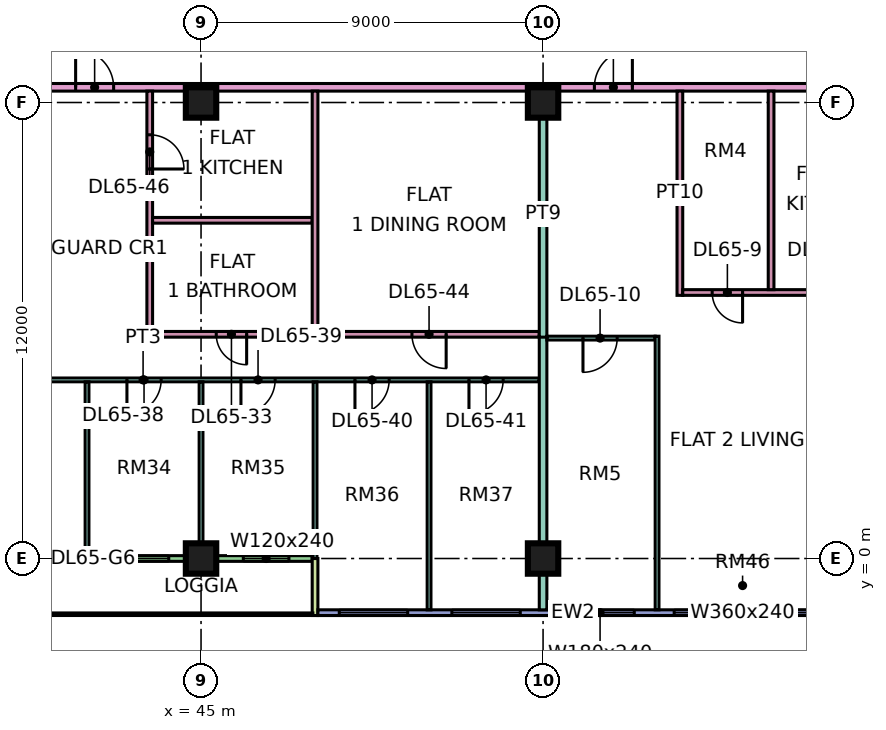
"""IFC4 building model, lengths in metres.
Left out: names, types, materials, properties, quantities, classifications, styles, units other than length and angle.
Written with IfcOpenShell. Run it as: python <this file> out.ifc"""

import sys

from ifc_helpers import new_model, si_unit, direction, frame, frame_2d, origin, origin_2d, place, context, subcontext, project, spatial, rectangle, extrude, element, fill, save


model = new_model("IFC4")
c1 = context("Model", 3, precision=1e-05, world=origin(), true_north=direction((0.0, 1.0)))
c2 = subcontext(c1, "Body", "Model", "MODEL_VIEW")
j1 = project(units=[si_unit("LENGTHUNIT", "METRE"), si_unit("PLANEANGLEUNIT", "RADIAN")], contexts=[c1])
p1 = place(None, origin())
s1 = spatial("IfcSite", under=j1, at=p1, CompositionType="ELEMENT")
p2 = place(p1, origin())
s2 = spatial("IfcBuilding", under=s1, at=p2, CompositionType="ELEMENT")
p3 = place(p2, frame((0.0, 0.0, 280.9)))
s3 = spatial("IfcBuildingStorey", under=s2, at=p3, CompositionType="ELEMENT", Elevation=280.9)
for number, where, z_axis, x_axis in (
    (1, (45.0, 0.0, 0.0), (0.0, 0.0, 1.0), (1.0, 0.0, 0.0)),
    (2, (45.0, 12.0, 0.0), (0.0, 0.0, 1.0), (1.0, 0.0, 0.0)),
    (3, (54.0, 0.0, 0.0), (0.0, 0.0, 1.0), (1.0, 0.0, 0.0)),
    (4, (54.0, 12.0, 0.0), (0.0, 0.0, 1.0), (1.0, 0.0, 0.0)),
):
    element("IfcColumn", number, at=place(p3, frame(where, z_axis=z_axis, x_axis=x_axis)), inside=s3, PredefinedType="COLUMN", context=c2, shape_type="SweptSolid", body=[
        extrude(rectangle(XDim=0.8, YDim=0.8, at=origin_2d()), origin(), (0.0, 0.0, 1.0), 3.75),
    ])
p4 = place(p3, frame((36.075, 0.0, 0.0), z_axis=(0.0, 0.0, 1.0), x_axis=(1.0, 0.0, 0.0)))
e5 = element("IfcWall", 5, at=p4, inside=s3, PredefinedType="SOLIDWALL", context=c2, shape_type="SweptSolid", body=[
    extrude(rectangle(XDim=11.85, YDim=0.15, at=frame_2d((5.925, 0.0))), origin(), (0.0, 0.0, 1.0), 3.35),
])
p5 = place(p4, frame((2.275, 0.0, 0.0)))
e6 = element("IfcOpeningElement", 6, at=p5, cuts=e5, PredefinedType="OPENING", context=c2, shape_type="SweptSolid", body=[
    extrude(rectangle(XDim=1.8, YDim=2.4, at=frame_2d((0.9, 1.2))), frame((0.0, 0.085, 0.0), z_axis=(0.0, -1.0, 0.0), x_axis=(1.0, 0.0, 0.0)), (0.0, 0.0, 1.0), 0.17),
])
p6 = place(p4, frame((6.275, 0.0, 0.45)))
e7 = element("IfcOpeningElement", 7, at=p6, cuts=e5, PredefinedType="OPENING", context=c2, shape_type="SweptSolid", body=[
    extrude(rectangle(XDim=1.8, YDim=2.4, at=frame_2d((0.9, 1.2))), frame((0.0, 0.085, 0.0), z_axis=(0.0, -1.0, 0.0), x_axis=(1.0, 0.0, 0.0)), (0.0, 0.0, 1.0), 0.17),
])
p7 = place(p4, frame((10.038, 0.0, 0.45)))
e8 = element("IfcOpeningElement", 8, at=p7, cuts=e5, PredefinedType="OPENING", context=c2, shape_type="SweptSolid", body=[
    extrude(rectangle(XDim=1.2, YDim=2.4, at=frame_2d((0.6, 1.2))), frame((0.0, 0.085, 0.0), z_axis=(0.0, -1.0, 0.0), x_axis=(1.0, 0.0, 0.0)), (0.0, 0.0, 1.0), 0.17),
])
p8 = place(p3, frame((48.0, -1.5, 0.0), z_axis=(0.0, 0.0, 1.0), x_axis=(0.0, 1.0, 0.0)))
e9 = element("IfcWall", 9, at=p8, inside=s3, PredefinedType="SOLIDWALL", context=c2, shape_type="SweptSolid", body=[
    extrude(rectangle(XDim=1.5, YDim=0.15, at=frame_2d((0.75, 0.0))), origin(), (0.0, 0.0, 1.0), 3.35),
])
p9 = place(p3, frame((48.075, -1.425, 0.0), z_axis=(0.0, 0.0, 1.0), x_axis=(1.0, 0.0, 0.0)))
e10 = element("IfcWall", 10, at=p9, inside=s3, PredefinedType="SOLIDWALL", context=c2, shape_type="SweptSolid", body=[
    extrude(rectangle(XDim=13.425, YDim=0.15, at=frame_2d((6.712, 0.0))), origin(), (0.0, 0.0, 1.0), 3.35),
])
p10 = place(p9, frame((0.562, 0.0, 0.45)))
e11 = element("IfcOpeningElement", 11, at=p10, cuts=e10, PredefinedType="OPENING", context=c2, shape_type="SweptSolid", body=[
    extrude(rectangle(XDim=1.8, YDim=2.4, at=frame_2d((0.9, 1.2))), frame((0.0, 0.085, 0.0), z_axis=(0.0, -1.0, 0.0), x_axis=(1.0, 0.0, 0.0)), (0.0, 0.0, 1.0), 0.17),
])
p11 = place(p9, frame((3.525, 0.0, 0.45)))
e12 = element("IfcOpeningElement", 12, at=p11, cuts=e10, PredefinedType="OPENING", context=c2, shape_type="SweptSolid", body=[
    extrude(rectangle(XDim=1.8, YDim=2.4, at=frame_2d((0.9, 1.2))), frame((0.0, 0.085, 0.0), z_axis=(0.0, -1.0, 0.0), x_axis=(1.0, 0.0, 0.0)), (0.0, 0.0, 1.0), 0.17),
])
p12 = place(p9, frame((6.525, 0.0, 0.45)))
e13 = element("IfcOpeningElement", 13, at=p12, cuts=e10, PredefinedType="OPENING", context=c2, shape_type="SweptSolid", body=[
    extrude(rectangle(XDim=1.8, YDim=2.4, at=frame_2d((0.9, 1.2))), frame((0.0, 0.085, 0.0), z_axis=(0.0, -1.0, 0.0), x_axis=(1.0, 0.0, 0.0)), (0.0, 0.0, 1.0), 0.17),
])
p13 = place(p9, frame((9.375, 0.0, 0.45)))
e14 = element("IfcOpeningElement", 14, at=p13, cuts=e10, PredefinedType="OPENING", context=c2, shape_type="SweptSolid", body=[
    extrude(rectangle(XDim=3.6, YDim=2.4, at=frame_2d((1.8, 1.2))), frame((0.0, 0.085, 0.0), z_axis=(0.0, -1.0, 0.0), x_axis=(1.0, 0.0, 0.0)), (0.0, 0.0, 1.0), 0.17),
])
p14 = place(p3, frame((33.05, 4.7, 0.0), z_axis=(0.0, 0.0, 1.0), x_axis=(1.0, 0.0, 0.0)))
e15 = element("IfcWall", 15, at=p14, inside=s3, PredefinedType="PARTITIONING", context=c2, shape_type="SweptSolid", body=[
    extrude(rectangle(XDim=20.85, YDim=0.1, at=frame_2d((10.425, 0.0))), origin(), (0.0, 0.0, 1.0), 3.35),
])
p15 = place(p14, frame((10.0, 0.0, 0.0)))
e16 = element("IfcOpeningElement", 16, at=p15, cuts=e15, PredefinedType="OPENING", context=c2, shape_type="SweptSolid", body=[
    extrude(rectangle(XDim=0.9, YDim=2.1, at=frame_2d((0.45, 1.05))), frame((0.0, 0.06, 0.0), z_axis=(0.0, -1.0, 0.0), x_axis=(1.0, 0.0, 0.0)), (0.0, 0.0, 1.0), 0.12),
])
p16 = place(p14, frame((13.0, 0.0, 0.0)))
e17 = element("IfcOpeningElement", 17, at=p16, cuts=e15, PredefinedType="OPENING", context=c2, shape_type="SweptSolid", body=[
    extrude(rectangle(XDim=0.9, YDim=2.1, at=frame_2d((0.45, 1.05))), frame((0.0, 0.06, 0.0), z_axis=(0.0, -1.0, 0.0), x_axis=(1.0, 0.0, 0.0)), (0.0, 0.0, 1.0), 0.12),
])
p17 = place(p14, frame((16.0, 0.0, 0.0)))
e18 = element("IfcOpeningElement", 18, at=p17, cuts=e15, PredefinedType="OPENING", context=c2, shape_type="SweptSolid", body=[
    extrude(rectangle(XDim=0.9, YDim=2.1, at=frame_2d((0.45, 1.05))), frame((0.0, 0.06, 0.0), z_axis=(0.0, -1.0, 0.0), x_axis=(1.0, 0.0, 0.0)), (0.0, 0.0, 1.0), 0.12),
])
p18 = place(p14, frame((19.0, 0.0, 0.0)))
e19 = element("IfcOpeningElement", 19, at=p18, cuts=e15, PredefinedType="OPENING", context=c2, shape_type="SweptSolid", body=[
    extrude(rectangle(XDim=0.9, YDim=2.1, at=frame_2d((0.45, 1.05))), frame((0.0, 0.06, 0.0), z_axis=(0.0, -1.0, 0.0), x_axis=(1.0, 0.0, 0.0)), (0.0, 0.0, 1.0), 0.12),
])
p19 = place(p14, frame((4.0, 0.0, 0.0)))
e20 = element("IfcOpeningElement", 20, at=p19, cuts=e15, PredefinedType="OPENING", context=c2, shape_type="SweptSolid", body=[
    extrude(rectangle(XDim=0.9, YDim=2.1, at=frame_2d((0.45, 1.05))), frame((0.0, 0.06, 0.0), z_axis=(0.0, -1.0, 0.0), x_axis=(1.0, 0.0, 0.0)), (0.0, 0.0, 1.0), 0.12),
])
p20 = place(p3, frame((40.65, 12.4, 0.0), z_axis=(0.0, 0.0, 1.0), x_axis=(1.0, 0.0, 0.0)))
e21 = element("IfcWall", 21, at=p20, inside=s3, PredefinedType="PARTITIONING", context=c2, shape_type="SweptSolid", body=[
    extrude(rectangle(XDim=22.276, YDim=0.2, at=frame_2d((11.138, 0.0))), origin(), (0.0, 0.0, 1.0), 3.35),
])
p21 = place(p20, frame((14.7, 0.0, 0.0)))
e22 = element("IfcOpeningElement", 22, at=p21, cuts=e21, PredefinedType="OPENING", context=c2, shape_type="SweptSolid", body=[
    extrude(rectangle(XDim=1.0, YDim=2.1, at=frame_2d((0.5, 1.05))), frame((0.0, 0.11, 0.0), z_axis=(0.0, -1.0, 0.0), x_axis=(1.0, 0.0, 0.0)), (0.0, 0.0, 1.0), 0.22),
])
p22 = place(p20, frame((1.05, 0.0, 0.0)))
e23 = element("IfcOpeningElement", 23, at=p22, cuts=e21, PredefinedType="OPENING", context=c2, shape_type="SweptSolid", body=[
    extrude(rectangle(XDim=1.0, YDim=2.1, at=frame_2d((0.5, 1.05))), frame((0.0, 0.11, 0.0), z_axis=(0.0, -1.0, 0.0), x_axis=(1.0, 0.0, 0.0)), (0.0, 0.0, 1.0), 0.22),
])
p23 = place(p3, frame((42.0, 0.074, 0.0), z_axis=(0.0, 0.0, 1.0), x_axis=(0.0, 1.0, 0.0)))
e24 = element("IfcWall", 24, at=p23, inside=s3, PredefinedType="PARTITIONING", context=c2, shape_type="SweptSolid", body=[
    extrude(rectangle(XDim=4.576, YDim=0.1, at=frame_2d((2.288, 0.0))), origin(), (0.0, 0.0, 1.0), 3.35),
])
p24 = place(p3, frame((43.575, 5.9, 0.0), z_axis=(0.0, 0.0, 1.0), x_axis=(1.0, 0.0, 0.0)))
e25 = element("IfcWall", 25, at=p24, inside=s3, PredefinedType="PARTITIONING", context=c2, shape_type="SweptSolid", body=[
    extrude(rectangle(XDim=10.325, YDim=0.15, at=frame_2d((5.163, 0.0))), origin(), (0.0, 0.0, 1.0), 3.35),
])
p25 = place(p24, frame((1.825, 0.0, 0.0)))
e26 = element("IfcOpeningElement", 26, at=p25, cuts=e25, PredefinedType="OPENING", context=c2, shape_type="SweptSolid", body=[
    extrude(rectangle(XDim=0.8, YDim=2.1, at=frame_2d((0.4, 1.05))), frame((0.0, 0.085, 0.0), z_axis=(0.0, -1.0, 0.0), x_axis=(1.0, 0.0, 0.0)), (0.0, 0.0, 1.0), 0.17),
])
p26 = place(p24, frame((6.975, 0.0, 0.0)))
e27 = element("IfcOpeningElement", 27, at=p26, cuts=e25, PredefinedType="OPENING", context=c2, shape_type="SweptSolid", body=[
    extrude(rectangle(XDim=0.9, YDim=2.1, at=frame_2d((0.45, 1.05))), frame((0.0, 0.085, 0.0), z_axis=(0.0, -1.0, 0.0), x_axis=(1.0, 0.0, 0.0)), (0.0, 0.0, 1.0), 0.17),
])
p27 = place(p3, frame((43.65, 5.975, 0.0), z_axis=(0.0, 0.0, 1.0), x_axis=(0.0, 1.0, 0.0)))
e28 = element("IfcWall", 28, at=p27, inside=s3, PredefinedType="PARTITIONING", context=c2, shape_type="SweptSolid", body=[
    extrude(rectangle(XDim=6.325, YDim=0.15, at=frame_2d((3.163, 0.0))), origin(), (0.0, 0.0, 1.0), 3.35),
])
p28 = place(p27, frame((4.275, 0.0, 0.0)))
e29 = element("IfcOpeningElement", 29, at=p28, cuts=e28, PredefinedType="OPENING", context=c2, shape_type="SweptSolid", body=[
    extrude(rectangle(XDim=0.9, YDim=2.1, at=frame_2d((0.45, 1.05))), frame((0.0, 0.085, 0.0), z_axis=(0.0, -1.0, 0.0), x_axis=(1.0, 0.0, 0.0)), (0.0, 0.0, 1.0), 0.17),
])
p29 = place(p3, frame((43.725, 8.9, 0.0), z_axis=(0.0, 0.0, 1.0), x_axis=(1.0, 0.0, 0.0)))
e30 = element("IfcWall", 30, at=p29, inside=s3, PredefinedType="PARTITIONING", context=c2, shape_type="SweptSolid", body=[
    extrude(rectangle(XDim=4.2, YDim=0.15, at=frame_2d((2.1, 0.0))), origin(), (0.0, 0.0, 1.0), 3.35),
])
p30 = place(p3, frame((45.0, 0.074, 0.0), z_axis=(0.0, 0.0, 1.0), x_axis=(0.0, 1.0, 0.0)))
e31 = element("IfcWall", 31, at=p30, inside=s3, PredefinedType="PARTITIONING", context=c2, shape_type="SweptSolid", body=[
    extrude(rectangle(XDim=4.576, YDim=0.1, at=frame_2d((2.288, 0.0))), origin(), (0.0, 0.0, 1.0), 3.35),
])
p31 = place(p3, frame((48.0, 0.0, 0.0), z_axis=(0.0, 0.0, 1.0), x_axis=(0.0, 1.0, 0.0)))
e32 = element("IfcWall", 32, at=p31, inside=s3, PredefinedType="PARTITIONING", context=c2, shape_type="SweptSolid", body=[
    extrude(rectangle(XDim=4.65, YDim=0.1, at=frame_2d((2.325, 0.0))), origin(), (0.0, 0.0, 1.0), 3.35),
])
p32 = place(p3, frame((48.0, 5.975, 0.0), z_axis=(0.0, 0.0, 1.0), x_axis=(0.0, 1.0, 0.0)))
e33 = element("IfcWall", 33, at=p32, inside=s3, PredefinedType="PARTITIONING", context=c2, shape_type="SweptSolid", body=[
    extrude(rectangle(XDim=6.325, YDim=0.15, at=frame_2d((3.163, 0.0))), origin(), (0.0, 0.0, 1.0), 3.35),
])
p33 = place(p3, frame((51.0, -1.351, 0.0), z_axis=(0.0, 0.0, 1.0), x_axis=(0.0, 1.0, 0.0)))
e34 = element("IfcWall", 34, at=p33, inside=s3, PredefinedType="PARTITIONING", context=c2, shape_type="SweptSolid", body=[
    extrude(rectangle(XDim=6.001, YDim=0.1, at=frame_2d((3.0, 0.0))), origin(), (0.0, 0.0, 1.0), 3.35),
])
p34 = place(p3, frame((54.0, -1.351, 0.0), z_axis=(0.0, 0.0, 1.0), x_axis=(0.0, 1.0, 0.0)))
e35 = element("IfcWall", 35, at=p34, inside=s3, PredefinedType="PARTITIONING", context=c2, shape_type="SweptSolid", body=[
    extrude(rectangle(XDim=7.201, YDim=0.2, at=frame_2d((3.601, 0.0))), origin(), (0.0, 0.0, 1.0), 3.35),
])
p35 = place(p3, frame((54.0, 5.825, 0.0), z_axis=(0.0, 0.0, 1.0), x_axis=(0.0, 1.0, 0.0)))
e36 = element("IfcWall", 36, at=p35, inside=s3, PredefinedType="PARTITIONING", context=c2, shape_type="SweptSolid", body=[
    extrude(rectangle(XDim=6.475, YDim=0.2, at=frame_2d((3.238, 0.0))), origin(), (0.0, 0.0, 1.0), 3.35),
])
p36 = place(p3, frame((54.1, 5.8, 0.0), z_axis=(0.0, 0.0, 1.0), x_axis=(1.0, 0.0, 0.0)))
e37 = element("IfcWall", 37, at=p36, inside=s3, PredefinedType="PARTITIONING", context=c2, shape_type="SweptSolid", body=[
    extrude(rectangle(XDim=2.85, YDim=0.1, at=frame_2d((1.425, 0.0))), origin(), (0.0, 0.0, 1.0), 3.35),
])
p37 = place(p36, frame((0.95, 0.0, 0.0)))
e38 = element("IfcOpeningElement", 38, at=p37, cuts=e37, PredefinedType="OPENING", context=c2, shape_type="SweptSolid", body=[
    extrude(rectangle(XDim=0.9, YDim=2.1, at=frame_2d((0.45, 1.05))), frame((0.0, 0.06, 0.0), z_axis=(0.0, -1.0, 0.0), x_axis=(1.0, 0.0, 0.0)), (0.0, 0.0, 1.0), 0.12),
])
p38 = place(p3, frame((57.0, -1.35, 0.0), z_axis=(0.0, 0.0, 1.0), x_axis=(0.0, 1.0, 0.0)))
e39 = element("IfcWall", 39, at=p38, inside=s3, PredefinedType="PARTITIONING", context=c2, shape_type="SweptSolid", body=[
    extrude(rectangle(XDim=7.2, YDim=0.1, at=frame_2d((3.6, 0.0))), origin(), (0.0, 0.0, 1.0), 3.35),
])
p39 = place(p3, frame((57.6, 6.925, 0.0), z_axis=(0.0, 0.0, 1.0), x_axis=(0.0, 1.0, 0.0)))
e40 = element("IfcWall", 40, at=p39, inside=s3, PredefinedType="PARTITIONING", context=c2, shape_type="SweptSolid", body=[
    extrude(rectangle(XDim=5.375, YDim=0.15, at=frame_2d((2.688, 0.0))), origin(), (0.0, 0.0, 1.0), 3.35),
])
p40 = place(p3, frame((57.675, 7.0, 0.0), z_axis=(0.0, 0.0, 1.0), x_axis=(1.0, 0.0, 0.0)))
e41 = element("IfcWall", 41, at=p40, inside=s3, PredefinedType="PARTITIONING", context=c2, shape_type="SweptSolid", body=[
    extrude(rectangle(XDim=6.675, YDim=0.15, at=frame_2d((3.337, 0.0))), origin(), (0.0, 0.0, 1.0), 3.35),
])
p41 = place(p40, frame((0.775, 0.0, 0.0)))
e42 = element("IfcOpeningElement", 42, at=p41, cuts=e41, PredefinedType="OPENING", context=c2, shape_type="SweptSolid", body=[
    extrude(rectangle(XDim=0.8, YDim=2.1, at=frame_2d((0.4, 1.05))), frame((0.0, 0.085, 0.0), z_axis=(0.0, -1.0, 0.0), x_axis=(1.0, 0.0, 0.0)), (0.0, 0.0, 1.0), 0.17),
])
p42 = place(p40, frame((3.375, 0.0, 0.0)))
e43 = element("IfcOpeningElement", 43, at=p42, cuts=e41, PredefinedType="OPENING", context=c2, shape_type="SweptSolid", body=[
    extrude(rectangle(XDim=0.9, YDim=2.1, at=frame_2d((0.45, 1.05))), frame((0.0, 0.085, 0.0), z_axis=(0.0, -1.0, 0.0), x_axis=(1.0, 0.0, 0.0)), (0.0, 0.0, 1.0), 0.17),
])
p43 = place(p3, frame((60.0, 7.075, 0.0), z_axis=(0.0, 0.0, 1.0), x_axis=(0.0, 1.0, 0.0)))
e44 = element("IfcWall", 44, at=p43, inside=s3, PredefinedType="PARTITIONING", context=c2, shape_type="SweptSolid", body=[
    extrude(rectangle(XDim=5.225, YDim=0.15, at=frame_2d((2.613, 0.0))), origin(), (0.0, 0.0, 1.0), 3.35),
])
p44 = place(p6, origin())
e45 = element("IfcWindow", 45, at=p44, inside=s3, PartitioningType="SINGLE_PANEL", PredefinedType="WINDOW", context=c2, shape_type="SweptSolid", body=[
    extrude(rectangle(XDim=1.8, YDim=2.4, at=frame_2d((0.9, 1.2))), frame((0.0, 0.03, 0.0), z_axis=(0.0, -1.0, 0.0), x_axis=(1.0, 0.0, 0.0)), (0.0, 0.0, 1.0), 0.06),
])
fill(e7, e45)
p45 = place(p7, origin())
e46 = element("IfcWindow", 46, at=p45, inside=s3, PartitioningType="SINGLE_PANEL", PredefinedType="WINDOW", context=c2, shape_type="SweptSolid", body=[
    extrude(rectangle(XDim=1.2, YDim=2.4, at=frame_2d((0.6, 1.2))), frame((0.0, 0.03, 0.0), z_axis=(0.0, -1.0, 0.0), x_axis=(1.0, 0.0, 0.0)), (0.0, 0.0, 1.0), 0.06),
])
fill(e8, e46)
p46 = place(p10, origin())
e47 = element("IfcWindow", 47, at=p46, inside=s3, PartitioningType="SINGLE_PANEL", PredefinedType="WINDOW", context=c2, shape_type="SweptSolid", body=[
    extrude(rectangle(XDim=1.8, YDim=2.4, at=frame_2d((0.9, 1.2))), frame((0.0, 0.03, 0.0), z_axis=(0.0, -1.0, 0.0), x_axis=(1.0, 0.0, 0.0)), (0.0, 0.0, 1.0), 0.06),
])
fill(e11, e47)
p47 = place(p11, origin())
e48 = element("IfcWindow", 48, at=p47, inside=s3, PartitioningType="SINGLE_PANEL", PredefinedType="WINDOW", context=c2, shape_type="SweptSolid", body=[
    extrude(rectangle(XDim=1.8, YDim=2.4, at=frame_2d((0.9, 1.2))), frame((0.0, 0.03, 0.0), z_axis=(0.0, -1.0, 0.0), x_axis=(1.0, 0.0, 0.0)), (0.0, 0.0, 1.0), 0.06),
])
fill(e12, e48)
p48 = place(p12, origin())
e49 = element("IfcWindow", 49, at=p48, inside=s3, PartitioningType="SINGLE_PANEL", PredefinedType="WINDOW", context=c2, shape_type="SweptSolid", body=[
    extrude(rectangle(XDim=1.8, YDim=2.4, at=frame_2d((0.9, 1.2))), frame((0.0, 0.03, 0.0), z_axis=(0.0, -1.0, 0.0), x_axis=(1.0, 0.0, 0.0)), (0.0, 0.0, 1.0), 0.06),
])
fill(e13, e49)
p49 = place(p13, origin())
e50 = element("IfcWindow", 50, at=p49, inside=s3, PartitioningType="SINGLE_PANEL", PredefinedType="WINDOW", context=c2, shape_type="SweptSolid", body=[
    extrude(rectangle(XDim=3.6, YDim=2.4, at=frame_2d((1.8, 1.2))), frame((0.0, 0.03, 0.0), z_axis=(0.0, -1.0, 0.0), x_axis=(1.0, 0.0, 0.0)), (0.0, 0.0, 1.0), 0.06),
])
fill(e14, e50)
p50 = place(p41, origin())
e51 = element("IfcDoor", 51, at=p50, inside=s3, OperationType="SINGLE_SWING_RIGHT", PredefinedType="DOOR", context=c2, shape_type="SweptSolid", body=[
    extrude(rectangle(XDim=0.8, YDim=2.1, at=frame_2d((0.4, 1.05))), frame((0.0, 0.025, 0.0), z_axis=(0.0, -1.0, 0.0), x_axis=(1.0, 0.0, 0.0)), (0.0, 0.0, 1.0), 0.05),
])
fill(e42, e51)
p51 = place(p37, frame((0.9, 0.0, 0.0), z_axis=(0.0, 0.0, 1.0), x_axis=(-1.0, 0.0, 0.0)))
e52 = element("IfcDoor", 52, at=p51, inside=s3, OperationType="SINGLE_SWING_LEFT", PredefinedType="DOOR", context=c2, shape_type="SweptSolid", body=[
    extrude(rectangle(XDim=0.9, YDim=2.1, at=frame_2d((0.45, 1.05))), frame((0.0, 0.025, 0.0), z_axis=(0.0, -1.0, 0.0), x_axis=(1.0, 0.0, 0.0)), (0.0, 0.0, 1.0), 0.05),
])
fill(e38, e52)
p52 = place(p21, frame((1.0, 0.0, 0.0), z_axis=(0.0, 0.0, 1.0), x_axis=(-1.0, 0.0, 0.0)))
e53 = element("IfcDoor", 53, at=p52, inside=s3, OperationType="SINGLE_SWING_RIGHT", PredefinedType="DOOR", context=c2, shape_type="SweptSolid", body=[
    extrude(rectangle(XDim=1.0, YDim=2.1, at=frame_2d((0.5, 1.05))), frame((0.0, 0.025, 0.0), z_axis=(0.0, -1.0, 0.0), x_axis=(1.0, 0.0, 0.0)), (0.0, 0.0, 1.0), 0.05),
])
fill(e22, e53)
p53 = place(p25, origin())
e54 = element("IfcDoor", 54, at=p53, inside=s3, OperationType="SINGLE_SWING_RIGHT", PredefinedType="DOOR", context=c2, shape_type="SweptSolid", body=[
    extrude(rectangle(XDim=0.8, YDim=2.1, at=frame_2d((0.4, 1.05))), frame((0.0, 0.025, 0.0), z_axis=(0.0, -1.0, 0.0), x_axis=(1.0, 0.0, 0.0)), (0.0, 0.0, 1.0), 0.05),
])
fill(e26, e54)
p54 = place(p15, frame((0.9, 0.0, 0.0), z_axis=(0.0, 0.0, 1.0), x_axis=(-1.0, 0.0, 0.0)))
e55 = element("IfcDoor", 55, at=p54, inside=s3, OperationType="SINGLE_SWING_LEFT", PredefinedType="DOOR", context=c2, shape_type="SweptSolid", body=[
    extrude(rectangle(XDim=0.9, YDim=2.1, at=frame_2d((0.45, 1.05))), frame((0.0, 0.025, 0.0), z_axis=(0.0, -1.0, 0.0), x_axis=(1.0, 0.0, 0.0)), (0.0, 0.0, 1.0), 0.05),
])
fill(e16, e55)
p55 = place(p16, frame((0.9, 0.0, 0.0), z_axis=(0.0, 0.0, 1.0), x_axis=(-1.0, 0.0, 0.0)))
e56 = element("IfcDoor", 56, at=p55, inside=s3, OperationType="SINGLE_SWING_LEFT", PredefinedType="DOOR", context=c2, shape_type="SweptSolid", body=[
    extrude(rectangle(XDim=0.9, YDim=2.1, at=frame_2d((0.45, 1.05))), frame((0.0, 0.025, 0.0), z_axis=(0.0, -1.0, 0.0), x_axis=(1.0, 0.0, 0.0)), (0.0, 0.0, 1.0), 0.05),
])
fill(e17, e56)
p56 = place(p17, frame((0.9, 0.0, 0.0), z_axis=(0.0, 0.0, 1.0), x_axis=(-1.0, 0.0, 0.0)))
e57 = element("IfcDoor", 57, at=p56, inside=s3, OperationType="SINGLE_SWING_LEFT", PredefinedType="DOOR", context=c2, shape_type="SweptSolid", body=[
    extrude(rectangle(XDim=0.9, YDim=2.1, at=frame_2d((0.45, 1.05))), frame((0.0, 0.025, 0.0), z_axis=(0.0, -1.0, 0.0), x_axis=(1.0, 0.0, 0.0)), (0.0, 0.0, 1.0), 0.05),
])
fill(e18, e57)
p57 = place(p18, frame((0.9, 0.0, 0.0), z_axis=(0.0, 0.0, 1.0), x_axis=(-1.0, 0.0, 0.0)))
e58 = element("IfcDoor", 58, at=p57, inside=s3, OperationType="SINGLE_SWING_LEFT", PredefinedType="DOOR", context=c2, shape_type="SweptSolid", body=[
    extrude(rectangle(XDim=0.9, YDim=2.1, at=frame_2d((0.45, 1.05))), frame((0.0, 0.025, 0.0), z_axis=(0.0, -1.0, 0.0), x_axis=(1.0, 0.0, 0.0)), (0.0, 0.0, 1.0), 0.05),
])
fill(e19, e58)
p58 = place(p26, origin())
e59 = element("IfcDoor", 59, at=p58, inside=s3, OperationType="SINGLE_SWING_RIGHT", PredefinedType="DOOR", context=c2, shape_type="SweptSolid", body=[
    extrude(rectangle(XDim=0.9, YDim=2.1, at=frame_2d((0.45, 1.05))), frame((0.0, 0.025, 0.0), z_axis=(0.0, -1.0, 0.0), x_axis=(1.0, 0.0, 0.0)), (0.0, 0.0, 1.0), 0.05),
])
fill(e27, e59)
p59 = place(p22, origin())
e60 = element("IfcDoor", 60, at=p59, inside=s3, OperationType="SINGLE_SWING_LEFT", PredefinedType="DOOR", context=c2, shape_type="SweptSolid", body=[
    extrude(rectangle(XDim=1.0, YDim=2.1, at=frame_2d((0.5, 1.05))), frame((0.0, 0.025, 0.0), z_axis=(0.0, -1.0, 0.0), x_axis=(1.0, 0.0, 0.0)), (0.0, 0.0, 1.0), 0.05),
])
fill(e23, e60)
p60 = place(p28, frame((0.9, 0.0, 0.0), z_axis=(0.0, 0.0, 1.0), x_axis=(-1.0, 0.0, 0.0)))
e61 = element("IfcDoor", 61, at=p60, inside=s3, OperationType="SINGLE_SWING_LEFT", PredefinedType="DOOR", context=c2, shape_type="SweptSolid", body=[
    extrude(rectangle(XDim=0.9, YDim=2.1, at=frame_2d((0.45, 1.05))), frame((0.0, 0.025, 0.0), z_axis=(0.0, -1.0, 0.0), x_axis=(1.0, 0.0, 0.0)), (0.0, 0.0, 1.0), 0.05),
])
fill(e29, e61)
save(model, sys.argv[1])
